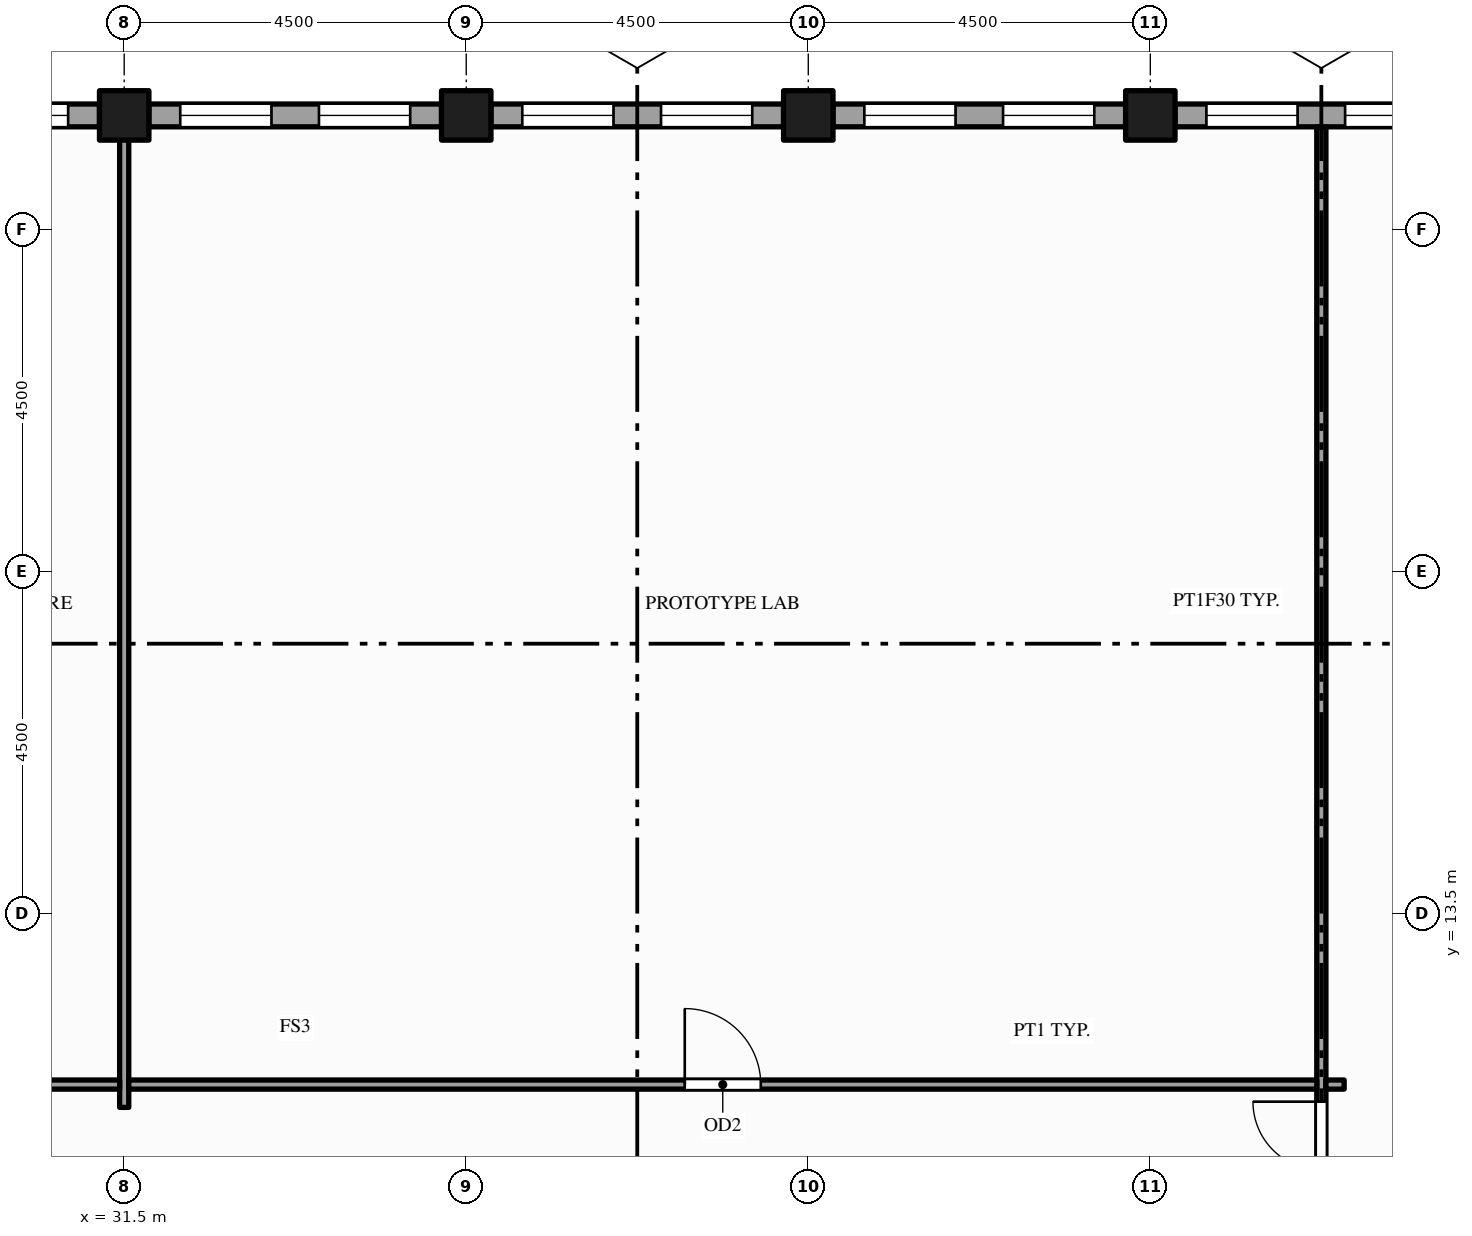
"""IFC4 building model, lengths in metres.
Left out: names, types, materials, properties, quantities, classifications, styles, units other than length and angle.
Written with IfcOpenShell. Run it as: python <this file> out.ifc"""

import sys

from ifc_helpers import new_model, si_unit, direction, frame, frame_2d, origin, origin_2d, place, context, subcontext, project, spatial, rectangle, hollow_rectangle, extrude, element, fill, save


model = new_model("IFC4")
c1 = context("Model", 3, precision=1e-05, world=origin(), true_north=direction((0.0, 1.0)))
c2 = subcontext(c1, "Body", "Model", "MODEL_VIEW")
j1 = project(units=[si_unit("LENGTHUNIT", "METRE"), si_unit("PLANEANGLEUNIT", "RADIAN")], contexts=[c1])
p1 = place(None, origin())
s1 = spatial("IfcSite", under=j1, at=p1, CompositionType="ELEMENT")
p2 = place(p1, origin())
s2 = spatial("IfcBuilding", under=s1, at=p2, CompositionType="ELEMENT")
p3 = place(p2, frame((0.0, 0.0, 293.0)))
s3 = spatial("IfcBuildingStorey", under=s2, at=p3, CompositionType="ELEMENT", Elevation=293.0)
for number, where, z_axis, x_axis in (
    (1, (31.5, 24.0, -0.15), (0.0, 0.0, 1.0), (1.0, 0.0, 0.0)),
    (2, (36.0, 24.0, -0.15), (0.0, 0.0, 1.0), (1.0, 0.0, 0.0)),
    (3, (40.5, 24.0, -0.15), (0.0, 0.0, 1.0), (1.0, 0.0, 0.0)),
    (4, (45.0, 24.0, -0.15), (0.0, 0.0, 1.0), (1.0, 0.0, 0.0)),
):
    element("IfcColumn", number, at=place(p3, frame(where, z_axis=z_axis, x_axis=x_axis)), inside=s3, PredefinedType="COLUMN", context=c2, shape_type="SweptSolid", body=[
        extrude(hollow_rectangle(XDim=0.65, YDim=0.65, WallThickness=0.032, at=origin_2d()), origin(), (0.0, 0.0, 1.0), 3.9),
    ])
p4 = place(p3, frame((49.175, 24.0, 0.0), z_axis=(0.0, 0.0, 1.0), x_axis=(-1.0, 0.0, 0.0)))
e5 = element("IfcWall", 5, at=p4, inside=s3, PredefinedType="STANDARD", context=c2, shape_type="SweptSolid", body=[
    extrude(rectangle(XDim=3.85, YDim=0.3, at=frame_2d((1.925, 0.0))), origin(), (0.0, 0.0, 1.0), 3.062),
])
p5 = place(p4, frame((0.413, 0.0, 0.9)))
e6 = element("IfcOpeningElement", 6, at=p5, cuts=e5, PredefinedType="OPENING", context=c2, shape_type="SweptSolid", body=[
    extrude(rectangle(XDim=1.2, YDim=2.0, at=frame_2d((0.6, 1.0))), frame((0.0, 0.16, 0.0), z_axis=(0.0, -1.0, 0.0), x_axis=(1.0, 0.0, 0.0)), (0.0, 0.0, 1.0), 0.32),
])
p6 = place(p4, frame((2.238, 0.0, 0.9)))
e7 = element("IfcOpeningElement", 7, at=p6, cuts=e5, PredefinedType="OPENING", context=c2, shape_type="SweptSolid", body=[
    extrude(rectangle(XDim=1.2, YDim=2.0, at=frame_2d((0.6, 1.0))), frame((0.0, 0.16, 0.0), z_axis=(0.0, -1.0, 0.0), x_axis=(1.0, 0.0, 0.0)), (0.0, 0.0, 1.0), 0.32),
])
p7 = place(p3, frame((44.675, 24.0, 0.0), z_axis=(0.0, 0.0, 1.0), x_axis=(-1.0, 0.0, 0.0)))
e8 = element("IfcWall", 8, at=p7, inside=s3, PredefinedType="STANDARD", context=c2, shape_type="SweptSolid", body=[
    extrude(rectangle(XDim=3.85, YDim=0.3, at=frame_2d((1.925, 0.0))), origin(), (0.0, 0.0, 1.0), 3.062),
])
p8 = place(p7, frame((0.413, 0.0, 0.9)))
e9 = element("IfcOpeningElement", 9, at=p8, cuts=e8, PredefinedType="OPENING", context=c2, shape_type="SweptSolid", body=[
    extrude(rectangle(XDim=1.2, YDim=2.0, at=frame_2d((0.6, 1.0))), frame((0.0, 0.16, 0.0), z_axis=(0.0, -1.0, 0.0), x_axis=(1.0, 0.0, 0.0)), (0.0, 0.0, 1.0), 0.32),
])
p9 = place(p7, frame((2.238, 0.0, 0.9)))
e10 = element("IfcOpeningElement", 10, at=p9, cuts=e8, PredefinedType="OPENING", context=c2, shape_type="SweptSolid", body=[
    extrude(rectangle(XDim=1.2, YDim=2.0, at=frame_2d((0.6, 1.0))), frame((0.0, 0.16, 0.0), z_axis=(0.0, -1.0, 0.0), x_axis=(1.0, 0.0, 0.0)), (0.0, 0.0, 1.0), 0.32),
])
p10 = place(p3, frame((40.175, 24.0, 0.0), z_axis=(0.0, 0.0, 1.0), x_axis=(-1.0, 0.0, 0.0)))
e11 = element("IfcWall", 11, at=p10, inside=s3, PredefinedType="STANDARD", context=c2, shape_type="SweptSolid", body=[
    extrude(rectangle(XDim=3.85, YDim=0.3, at=frame_2d((1.925, 0.0))), origin(), (0.0, 0.0, 1.0), 3.062),
])
p11 = place(p10, frame((0.413, 0.0, 0.9)))
e12 = element("IfcOpeningElement", 12, at=p11, cuts=e11, PredefinedType="OPENING", context=c2, shape_type="SweptSolid", body=[
    extrude(rectangle(XDim=1.2, YDim=2.0, at=frame_2d((0.6, 1.0))), frame((0.0, 0.16, 0.0), z_axis=(0.0, -1.0, 0.0), x_axis=(1.0, 0.0, 0.0)), (0.0, 0.0, 1.0), 0.32),
])
p12 = place(p10, frame((2.238, 0.0, 0.9)))
e13 = element("IfcOpeningElement", 13, at=p12, cuts=e11, PredefinedType="OPENING", context=c2, shape_type="SweptSolid", body=[
    extrude(rectangle(XDim=1.2, YDim=2.0, at=frame_2d((0.6, 1.0))), frame((0.0, 0.16, 0.0), z_axis=(0.0, -1.0, 0.0), x_axis=(1.0, 0.0, 0.0)), (0.0, 0.0, 1.0), 0.32),
])
p13 = place(p3, frame((35.675, 24.0, 0.0), z_axis=(0.0, 0.0, 1.0), x_axis=(-1.0, 0.0, 0.0)))
e14 = element("IfcWall", 14, at=p13, inside=s3, PredefinedType="STANDARD", context=c2, shape_type="SweptSolid", body=[
    extrude(rectangle(XDim=3.85, YDim=0.3, at=frame_2d((1.925, 0.0))), origin(), (0.0, 0.0, 1.0), 3.062),
])
p14 = place(p13, frame((0.413, 0.0, 0.9)))
e15 = element("IfcOpeningElement", 15, at=p14, cuts=e14, PredefinedType="OPENING", context=c2, shape_type="SweptSolid", body=[
    extrude(rectangle(XDim=1.2, YDim=2.0, at=frame_2d((0.6, 1.0))), frame((0.0, 0.16, 0.0), z_axis=(0.0, -1.0, 0.0), x_axis=(1.0, 0.0, 0.0)), (0.0, 0.0, 1.0), 0.32),
])
p15 = place(p13, frame((2.238, 0.0, 0.9)))
e16 = element("IfcOpeningElement", 16, at=p15, cuts=e14, PredefinedType="OPENING", context=c2, shape_type="SweptSolid", body=[
    extrude(rectangle(XDim=1.2, YDim=2.0, at=frame_2d((0.6, 1.0))), frame((0.0, 0.16, 0.0), z_axis=(0.0, -1.0, 0.0), x_axis=(1.0, 0.0, 0.0)), (0.0, 0.0, 1.0), 0.32),
])
p16 = place(p3, frame((31.175, 24.0, 0.0), z_axis=(0.0, 0.0, 1.0), x_axis=(-1.0, 0.0, 0.0)))
e17 = element("IfcWall", 17, at=p16, inside=s3, PredefinedType="STANDARD", context=c2, shape_type="SweptSolid", body=[
    extrude(rectangle(XDim=3.85, YDim=0.3, at=frame_2d((1.925, 0.0))), origin(), (0.0, 0.0, 1.0), 3.062),
])
p17 = place(p16, frame((0.413, 0.0, 0.9)))
e18 = element("IfcOpeningElement", 18, at=p17, cuts=e17, PredefinedType="OPENING", context=c2, shape_type="SweptSolid", body=[
    extrude(rectangle(XDim=1.2, YDim=2.0, at=frame_2d((0.6, 1.0))), frame((0.0, 0.16, 0.0), z_axis=(0.0, -1.0, 0.0), x_axis=(1.0, 0.0, 0.0)), (0.0, 0.0, 1.0), 0.32),
])
p18 = place(p16, frame((2.238, 0.0, 0.9)))
e19 = element("IfcOpeningElement", 19, at=p18, cuts=e17, PredefinedType="OPENING", context=c2, shape_type="SweptSolid", body=[
    extrude(rectangle(XDim=1.2, YDim=2.0, at=frame_2d((0.6, 1.0))), frame((0.0, 0.16, 0.0), z_axis=(0.0, -1.0, 0.0), x_axis=(1.0, 0.0, 0.0)), (0.0, 0.0, 1.0), 0.32),
])
p19 = place(p3, frame((31.5, 10.95, 0.0), z_axis=(0.0, 0.0, 1.0), x_axis=(0.0, 1.0, 0.0)))
e20 = element("IfcWall", 20, at=p19, inside=s3, PredefinedType="PARTITIONING", context=c2, shape_type="SweptSolid", body=[
    extrude(rectangle(XDim=12.9, YDim=0.12, at=frame_2d((6.45, 0.0))), origin(), (0.0, 0.0, 1.0), 2.35),
])
p20 = place(p3, frame((47.25, 1.65, 0.0), z_axis=(0.0, 0.0, 1.0), x_axis=(0.0, 1.0, 0.0)))
e21 = element("IfcWall", 21, at=p20, inside=s3, PredefinedType="PARTITIONING", context=c2, shape_type="SweptSolid", body=[
    extrude(rectangle(XDim=22.2, YDim=0.12, at=frame_2d((11.1, 0.0))), origin(), (0.0, 0.0, 1.0), 2.77),
])
p21 = place(p20, frame((7.575, 0.0, 0.0)))
e22 = element("IfcOpeningElement", 22, at=p21, cuts=e21, PredefinedType="OPENING", context=c2, shape_type="SweptSolid", body=[
    extrude(rectangle(XDim=1.8, YDim=2.1, at=frame_2d((0.9, 1.05))), frame((0.0, 0.07, 0.0), z_axis=(0.0, -1.0, 0.0), x_axis=(1.0, 0.0, 0.0)), (0.0, 0.0, 1.0), 0.14),
])
p22 = place(p20, frame((0.85, 0.0, 0.0)))
e23 = element("IfcOpeningElement", 23, at=p22, cuts=e21, PredefinedType="OPENING", context=c2, shape_type="SweptSolid", body=[
    extrude(rectangle(XDim=0.9, YDim=2.1, at=frame_2d((0.45, 1.05))), frame((0.0, 0.07, 0.0), z_axis=(0.0, -1.0, 0.0), x_axis=(1.0, 0.0, 0.0)), (0.0, 0.0, 1.0), 0.14),
])
p23 = place(p20, frame((3.15, 0.0, 0.0)))
e24 = element("IfcOpeningElement", 24, at=p23, cuts=e21, PredefinedType="OPENING", context=c2, shape_type="SweptSolid", body=[
    extrude(rectangle(XDim=0.9, YDim=2.1, at=frame_2d((0.45, 1.05))), frame((0.0, 0.07, 0.0), z_axis=(0.0, -1.0, 0.0), x_axis=(1.0, 0.0, 0.0)), (0.0, 0.0, 1.0), 0.14),
])
p24 = place(p20, frame((5.35, 0.0, 0.0)))
e25 = element("IfcOpeningElement", 25, at=p24, cuts=e21, PredefinedType="OPENING", context=c2, shape_type="SweptSolid", body=[
    extrude(rectangle(XDim=1.0, YDim=2.1, at=frame_2d((0.5, 1.05))), frame((0.0, 0.07, 0.0), z_axis=(0.0, -1.0, 0.0), x_axis=(1.0, 0.0, 0.0)), (0.0, 0.0, 1.0), 0.14),
])
p25 = place(p3, frame((27.06, 11.25, 0.0), z_axis=(0.0, 0.0, 1.0), x_axis=(1.0, 0.0, 0.0)))
e26 = element("IfcWall", 26, at=p25, inside=s3, PredefinedType="PARTITIONING", context=c2, shape_type="SweptSolid", body=[
    extrude(rectangle(XDim=4.38, YDim=0.12, at=frame_2d((2.19, 0.0))), origin(), (0.0, 0.0, 1.0), 2.77),
])
p26 = place(p25, frame((1.74, 0.0, 0.0)))
e27 = element("IfcOpeningElement", 27, at=p26, cuts=e26, PredefinedType="OPENING", context=c2, shape_type="SweptSolid", body=[
    extrude(rectangle(XDim=0.9, YDim=2.1, at=frame_2d((0.45, 1.05))), frame((0.0, 0.07, 0.0), z_axis=(0.0, -1.0, 0.0), x_axis=(1.0, 0.0, 0.0)), (0.0, 0.0, 1.0), 0.14),
])
p27 = place(p3, frame((31.56, 11.25, 0.0), z_axis=(0.0, 0.0, 1.0), x_axis=(1.0, 0.0, 0.0)))
e28 = element("IfcWall", 28, at=p27, inside=s3, PredefinedType="PARTITIONING", context=c2, shape_type="SweptSolid", body=[
    extrude(rectangle(XDim=15.63, YDim=0.12, at=frame_2d((7.815, 0.0))), origin(), (0.0, 0.0, 1.0), 2.77),
])
p28 = place(p27, frame((7.315, 0.0, 0.0)))
e29 = element("IfcOpeningElement", 29, at=p28, cuts=e28, PredefinedType="OPENING", context=c2, shape_type="SweptSolid", body=[
    extrude(rectangle(XDim=1.0, YDim=2.1, at=frame_2d((0.5, 1.05))), frame((0.0, 0.07, 0.0), z_axis=(0.0, -1.0, 0.0), x_axis=(1.0, 0.0, 0.0)), (0.0, 0.0, 1.0), 0.14),
])
p29 = place(p3, frame((47.31, 11.25, 0.0), z_axis=(0.0, 0.0, 1.0), x_axis=(1.0, 0.0, 0.0)))
e30 = element("IfcWall", 30, at=p29, inside=s3, PredefinedType="PARTITIONING", context=c2, shape_type="SweptSolid", body=[
    extrude(rectangle(XDim=0.24, YDim=0.12, at=frame_2d((0.12, 0.0))), origin(), (0.0, 0.0, 1.0), 2.77),
])
p30 = place(p5, origin())
e31 = element("IfcWindow", 31, at=p30, inside=s3, PartitioningType="SINGLE_PANEL", PredefinedType="WINDOW", context=c2, shape_type="SweptSolid", body=[
    extrude(rectangle(XDim=1.2, YDim=2.0, at=frame_2d((0.6, 1.0))), frame((0.0, 0.03, 0.0), z_axis=(0.0, -1.0, 0.0), x_axis=(1.0, 0.0, 0.0)), (0.0, 0.0, 1.0), 0.06),
])
fill(e6, e31)
p31 = place(p6, origin())
e32 = element("IfcWindow", 32, at=p31, inside=s3, PartitioningType="SINGLE_PANEL", PredefinedType="WINDOW", context=c2, shape_type="SweptSolid", body=[
    extrude(rectangle(XDim=1.2, YDim=2.0, at=frame_2d((0.6, 1.0))), frame((0.0, 0.03, 0.0), z_axis=(0.0, -1.0, 0.0), x_axis=(1.0, 0.0, 0.0)), (0.0, 0.0, 1.0), 0.06),
])
fill(e7, e32)
p32 = place(p8, origin())
e33 = element("IfcWindow", 33, at=p32, inside=s3, PartitioningType="SINGLE_PANEL", PredefinedType="WINDOW", context=c2, shape_type="SweptSolid", body=[
    extrude(rectangle(XDim=1.2, YDim=2.0, at=frame_2d((0.6, 1.0))), frame((0.0, 0.03, 0.0), z_axis=(0.0, -1.0, 0.0), x_axis=(1.0, 0.0, 0.0)), (0.0, 0.0, 1.0), 0.06),
])
fill(e9, e33)
p33 = place(p9, origin())
e34 = element("IfcWindow", 34, at=p33, inside=s3, PartitioningType="SINGLE_PANEL", PredefinedType="WINDOW", context=c2, shape_type="SweptSolid", body=[
    extrude(rectangle(XDim=1.2, YDim=2.0, at=frame_2d((0.6, 1.0))), frame((0.0, 0.03, 0.0), z_axis=(0.0, -1.0, 0.0), x_axis=(1.0, 0.0, 0.0)), (0.0, 0.0, 1.0), 0.06),
])
fill(e10, e34)
p34 = place(p11, origin())
e35 = element("IfcWindow", 35, at=p34, inside=s3, PartitioningType="SINGLE_PANEL", PredefinedType="WINDOW", context=c2, shape_type="SweptSolid", body=[
    extrude(rectangle(XDim=1.2, YDim=2.0, at=frame_2d((0.6, 1.0))), frame((0.0, 0.03, 0.0), z_axis=(0.0, -1.0, 0.0), x_axis=(1.0, 0.0, 0.0)), (0.0, 0.0, 1.0), 0.06),
])
fill(e12, e35)
p35 = place(p12, origin())
e36 = element("IfcWindow", 36, at=p35, inside=s3, PartitioningType="SINGLE_PANEL", PredefinedType="WINDOW", context=c2, shape_type="SweptSolid", body=[
    extrude(rectangle(XDim=1.2, YDim=2.0, at=frame_2d((0.6, 1.0))), frame((0.0, 0.03, 0.0), z_axis=(0.0, -1.0, 0.0), x_axis=(1.0, 0.0, 0.0)), (0.0, 0.0, 1.0), 0.06),
])
fill(e13, e36)
p36 = place(p14, origin())
e37 = element("IfcWindow", 37, at=p36, inside=s3, PartitioningType="SINGLE_PANEL", PredefinedType="WINDOW", context=c2, shape_type="SweptSolid", body=[
    extrude(rectangle(XDim=1.2, YDim=2.0, at=frame_2d((0.6, 1.0))), frame((0.0, 0.03, 0.0), z_axis=(0.0, -1.0, 0.0), x_axis=(1.0, 0.0, 0.0)), (0.0, 0.0, 1.0), 0.06),
])
fill(e15, e37)
p37 = place(p15, origin())
e38 = element("IfcWindow", 38, at=p37, inside=s3, PartitioningType="SINGLE_PANEL", PredefinedType="WINDOW", context=c2, shape_type="SweptSolid", body=[
    extrude(rectangle(XDim=1.2, YDim=2.0, at=frame_2d((0.6, 1.0))), frame((0.0, 0.03, 0.0), z_axis=(0.0, -1.0, 0.0), x_axis=(1.0, 0.0, 0.0)), (0.0, 0.0, 1.0), 0.06),
])
fill(e16, e38)
p38 = place(p17, origin())
e39 = element("IfcWindow", 39, at=p38, inside=s3, PartitioningType="SINGLE_PANEL", PredefinedType="WINDOW", context=c2, shape_type="SweptSolid", body=[
    extrude(rectangle(XDim=1.2, YDim=2.0, at=frame_2d((0.6, 1.0))), frame((0.0, 0.03, 0.0), z_axis=(0.0, -1.0, 0.0), x_axis=(1.0, 0.0, 0.0)), (0.0, 0.0, 1.0), 0.06),
])
fill(e18, e39)
p39 = place(p21, origin())
e40 = element("IfcDoor", 40, at=p39, inside=s3, OperationType="DOUBLE_DOOR_SINGLE_SWING", PredefinedType="DOOR", context=c2, shape_type="SweptSolid", body=[
    extrude(rectangle(XDim=1.8, YDim=2.1, at=frame_2d((0.9, 1.05))), frame((0.0, 0.025, 0.0), z_axis=(0.0, -1.0, 0.0), x_axis=(1.0, 0.0, 0.0)), (0.0, 0.0, 1.0), 0.05),
])
fill(e22, e40)
p40 = place(p28, origin())
e41 = element("IfcDoor", 41, at=p40, inside=s3, OperationType="SINGLE_SWING_LEFT", PredefinedType="DOOR", context=c2, shape_type="SweptSolid", body=[
    extrude(rectangle(XDim=1.0, YDim=2.1, at=frame_2d((0.5, 1.05))), frame((0.0, 0.025, 0.0), z_axis=(0.0, -1.0, 0.0), x_axis=(1.0, 0.0, 0.0)), (0.0, 0.0, 1.0), 0.05),
])
fill(e29, e41)
save(model, sys.argv[1])
